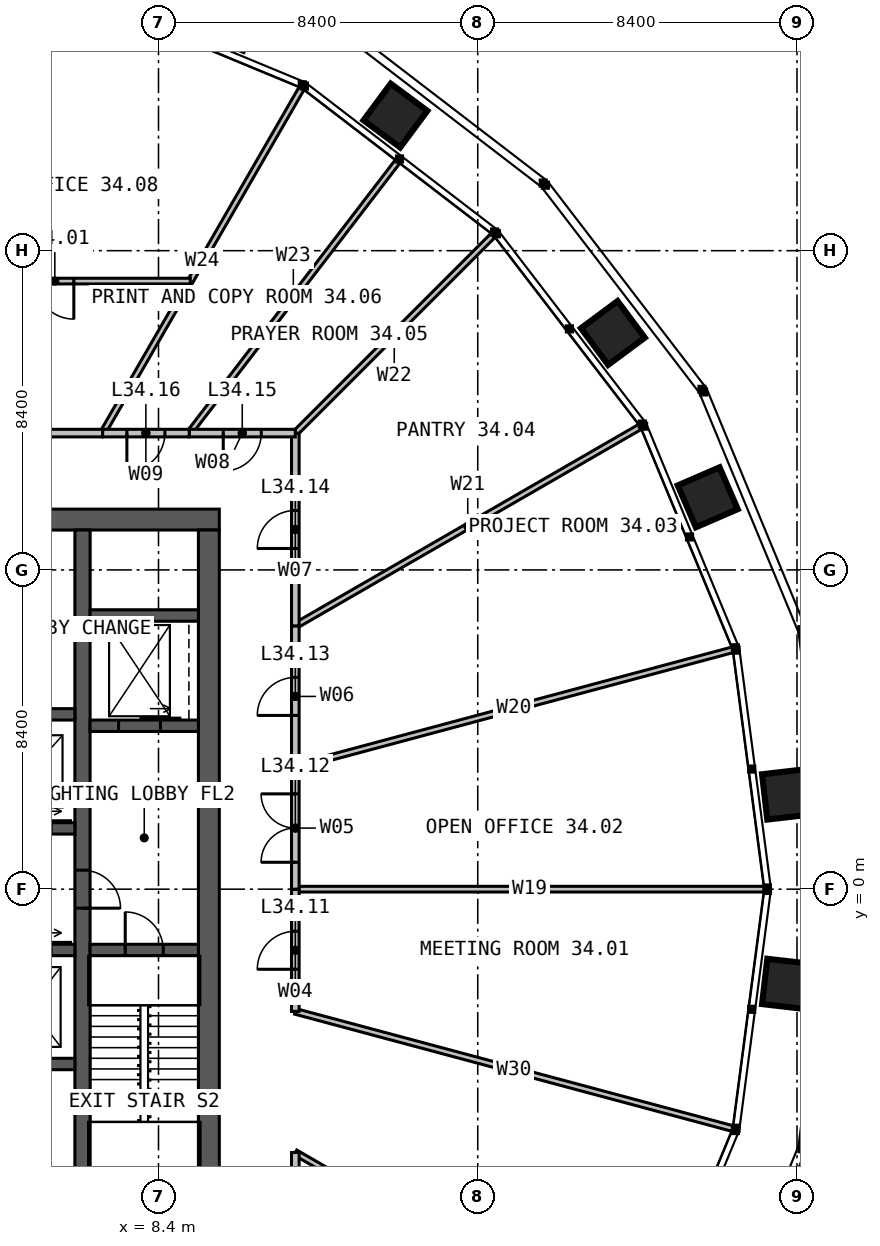
"""IFC4 building model, lengths in metres.
Left out: names, types, materials, properties, quantities, classifications, styles, units other than length and angle.
Written with IfcOpenShell. Run it as: python <this file> out.ifc"""

import sys

from ifc_helpers import new_model, si_unit, direction, frame, frame_2d, origin, place, context, subcontext, project, spatial, rectangle, extrude, element, fill, save


model = new_model("IFC4")
c1 = context("Model", 3, precision=1e-05, world=origin(), true_north=direction((0.0, 1.0)))
c2 = subcontext(c1, "Body", "Model", "MODEL_VIEW")
j1 = project(units=[si_unit("LENGTHUNIT", "METRE"), si_unit("PLANEANGLEUNIT", "RADIAN")], contexts=[c1])
p1 = place(None, origin())
s1 = spatial("IfcSite", under=j1, at=p1, CompositionType="ELEMENT")
p2 = place(p1, origin())
s2 = spatial("IfcBuilding", under=s1, at=p2, CompositionType="ELEMENT")
p3 = place(p2, frame((0.0, 0.0, 142.0)))
s3 = spatial("IfcBuildingStorey", under=s2, at=p3, CompositionType="ELEMENT", Elevation=142.0)
p4 = place(p3, frame((-10.0, 9.725, 0.0), z_axis=(0.0, 0.0, 1.0), x_axis=(1.0, 0.0, 0.0)))
e1 = element("IfcWall", 1, at=p4, inside=s3, PredefinedType="SOLIDWALL", context=c2, shape_type="SweptSolid", body=[
    extrude(rectangle(XDim=20.0, YDim=0.55, at=frame_2d((10.0, 0.0))), origin(), (0.0, 0.0, 1.0), 4.0),
])
p5 = place(p4, frame((9.4, 0.0, 0.0)))
e2 = element("IfcOpeningElement", 2, at=p5, cuts=e1, PredefinedType="OPENING", context=c2, shape_type="SweptSolid", body=[
    extrude(rectangle(XDim=1.2, YDim=2.2, at=frame_2d((0.6, 1.1))), frame((0.0, 0.285, 0.0), z_axis=(0.0, -1.0, 0.0), x_axis=(1.0, 0.0, 0.0)), (0.0, 0.0, 1.0), 0.57),
])
p6 = place(p3, frame((9.725, -9.45, 0.0), z_axis=(0.0, 0.0, 1.0), x_axis=(0.0, 1.0, 0.0)))
e3 = element("IfcWall", 3, at=p6, inside=s3, PredefinedType="SOLIDWALL", context=c2, shape_type="SweptSolid", body=[
    extrude(rectangle(XDim=18.9, YDim=0.55, at=frame_2d((9.45, 0.0))), origin(), (0.0, 0.0, 1.0), 4.0),
])
p7 = place(p3, frame((6.4, 9.45, 0.0), z_axis=(0.0, 0.0, 1.0), x_axis=(0.0, -1.0, 0.0)))
e4 = element("IfcWall", 4, at=p7, inside=s3, PredefinedType="SOLIDWALL", context=c2, shape_type="SweptSolid", body=[
    extrude(rectangle(XDim=18.9, YDim=0.4, at=frame_2d((9.45, 0.0))), origin(), (0.0, 0.0, 1.0), 4.0),
])
p8 = place(p7, frame((8.95, 0.0, 0.0)))
e5 = element("IfcOpeningElement", 5, at=p8, cuts=e4, PredefinedType="OPENING", context=c2, shape_type="SweptSolid", body=[
    extrude(rectangle(XDim=1.0, YDim=2.2, at=frame_2d((0.5, 1.1))), frame((0.0, 0.21, 0.0), z_axis=(0.0, -1.0, 0.0), x_axis=(1.0, 0.0, 0.0)), (0.0, 0.0, 1.0), 0.42),
])
p9 = place(p3, frame((1.35, 1.6, 0.0), z_axis=(0.0, 0.0, 1.0), x_axis=(1.0, 0.0, 0.0)))
e6 = element("IfcWall", 6, at=p9, inside=s3, PredefinedType="SOLIDWALL", context=c2, shape_type="SweptSolid", body=[
    extrude(rectangle(XDim=4.85, YDim=0.3, at=frame_2d((2.425, 0.0))), origin(), (0.0, 0.0, 1.0), 4.0),
])
p10 = place(p9, frame((0.6, 0.0, 0.0)))
e7 = element("IfcOpeningElement", 7, at=p10, cuts=e6, PredefinedType="OPENING", context=c2, shape_type="SweptSolid", body=[
    extrude(rectangle(XDim=1.1, YDim=2.2, at=frame_2d((0.55, 1.1))), frame((0.0, 0.16, 0.0), z_axis=(0.0, -1.0, 0.0), x_axis=(1.0, 0.0, 0.0)), (0.0, 0.0, 1.0), 0.32),
])
p11 = place(p9, frame((3.125, 0.0, 0.0)))
e8 = element("IfcOpeningElement", 8, at=p11, cuts=e6, PredefinedType="OPENING", context=c2, shape_type="SweptSolid", body=[
    extrude(rectangle(XDim=1.1, YDim=2.2, at=frame_2d((0.55, 1.1))), frame((0.0, 0.16, 0.0), z_axis=(0.0, -1.0, 0.0), x_axis=(1.0, 0.0, 0.0)), (0.0, 0.0, 1.0), 0.32),
])
p12 = place(p3, frame((1.35, 4.6, 0.0), z_axis=(0.0, 0.0, 1.0), x_axis=(1.0, 0.0, 0.0)))
e9 = element("IfcWall", 9, at=p12, inside=s3, PredefinedType="SOLIDWALL", context=c2, shape_type="SweptSolid", body=[
    extrude(rectangle(XDim=4.85, YDim=0.3, at=frame_2d((2.425, 0.0))), origin(), (0.0, 0.0, 1.0), 4.0),
])
p13 = place(p3, frame((3.85, -1.6, 0.0), z_axis=(0.0, 0.0, 1.0), x_axis=(1.0, 0.0, 0.0)))
e10 = element("IfcWall", 10, at=p13, inside=s3, PredefinedType="SOLIDWALL", context=c2, shape_type="SweptSolid", body=[
    extrude(rectangle(XDim=2.35, YDim=0.3, at=frame_2d((1.175, 0.0))), origin(), (0.0, 0.0, 1.0), 4.0),
])
p14 = place(p13, frame((0.625, 0.0, 0.0)))
e11 = element("IfcOpeningElement", 11, at=p14, cuts=e10, PredefinedType="OPENING", context=c2, shape_type="SweptSolid", body=[
    extrude(rectangle(XDim=1.1, YDim=2.2, at=frame_2d((0.55, 1.1))), frame((0.0, 0.16, 0.0), z_axis=(0.0, -1.0, 0.0), x_axis=(1.0, 0.0, 0.0)), (0.0, 0.0, 1.0), 0.32),
])
p15 = place(p3, frame((3.85, -4.6, 0.0), z_axis=(0.0, 0.0, 1.0), x_axis=(1.0, 0.0, 0.0)))
e12 = element("IfcWall", 12, at=p15, inside=s3, PredefinedType="SOLIDWALL", context=c2, shape_type="SweptSolid", body=[
    extrude(rectangle(XDim=2.35, YDim=0.3, at=frame_2d((1.175, 0.0))), origin(), (0.0, 0.0, 1.0), 4.0),
])
p16 = place(p3, frame((6.6, -1.6, 0.0), z_axis=(0.0, 0.0, 1.0), x_axis=(1.0, 0.0, 0.0)))
e13 = element("IfcWall", 13, at=p16, inside=s3, PredefinedType="SOLIDWALL", context=c2, shape_type="SweptSolid", body=[
    extrude(rectangle(XDim=2.85, YDim=0.3, at=frame_2d((1.425, 0.0))), origin(), (0.0, 0.0, 1.0), 4.0),
])
p17 = place(p16, frame((0.925, 0.0, 0.0)))
e14 = element("IfcOpeningElement", 14, at=p17, cuts=e13, PredefinedType="OPENING", context=c2, shape_type="SweptSolid", body=[
    extrude(rectangle(XDim=1.0, YDim=2.2, at=frame_2d((0.5, 1.1))), frame((0.0, 0.16, 0.0), z_axis=(0.0, -1.0, 0.0), x_axis=(1.0, 0.0, 0.0)), (0.0, 0.0, 1.0), 0.32),
])
p18 = place(p3, frame((6.6, 4.3, 0.0), z_axis=(0.0, 0.0, 1.0), x_axis=(1.0, 0.0, 0.0)))
e15 = element("IfcWall", 15, at=p18, inside=s3, PredefinedType="SOLIDWALL", context=c2, shape_type="SweptSolid", body=[
    extrude(rectangle(XDim=2.85, YDim=0.3, at=frame_2d((1.425, 0.0))), origin(), (0.0, 0.0, 1.0), 4.0),
])
p19 = place(p18, frame((0.75, 0.0, 0.0)))
e16 = element("IfcOpeningElement", 16, at=p19, cuts=e15, PredefinedType="OPENING", context=c2, shape_type="SweptSolid", body=[
    extrude(rectangle(XDim=1.1, YDim=2.2, at=frame_2d((0.55, 1.1))), frame((0.0, 0.16, 0.0), z_axis=(0.0, -1.0, 0.0), x_axis=(1.0, 0.0, 0.0)), (0.0, 0.0, 1.0), 0.32),
])
p20 = place(p3, frame((6.6, 7.2, 0.0), z_axis=(0.0, 0.0, 1.0), x_axis=(1.0, 0.0, 0.0)))
e17 = element("IfcWall", 17, at=p20, inside=s3, PredefinedType="SOLIDWALL", context=c2, shape_type="SweptSolid", body=[
    extrude(rectangle(XDim=2.85, YDim=0.3, at=frame_2d((1.425, 0.0))), origin(), (0.0, 0.0, 1.0), 4.0),
])
p21 = place(p3, frame((1.35, 6.8, 0.0), z_axis=(0.0, 0.0, 1.0), x_axis=(1.0, 0.0, 0.0)))
e18 = element("IfcWall", 18, at=p21, inside=s3, PredefinedType="PARTITIONING", context=c2, shape_type="SweptSolid", body=[
    extrude(rectangle(XDim=4.85, YDim=0.15, at=frame_2d((2.425, 0.0))), origin(), (0.0, 0.0, 1.0), 3.75),
])
p22 = place(p3, frame((12.0, -6.928, 0.0), z_axis=(0.0, 0.0, 1.0), x_axis=(0.866029212144, -0.49999340367, 0.0)))
e19 = element("IfcWall", 19, at=p22, inside=s3, PredefinedType="PARTITIONING", context=c2, shape_type="SweptSolid", body=[
    extrude(rectangle(XDim=10.478, YDim=0.15, at=frame_2d((5.239, 0.0))), origin(), (0.0, 0.0, 1.0), 2.79),
])
p23 = place(p3, frame((12.0, -3.215, 0.0), z_axis=(0.0, 0.0, 1.0), x_axis=(0.965926367889, -0.258817023816, 0.0)))
e20 = element("IfcWall", 20, at=p23, inside=s3, PredefinedType="PARTITIONING", context=c2, shape_type="SweptSolid", body=[
    extrude(rectangle(XDim=11.911, YDim=0.15, at=frame_2d((5.956, 0.0))), origin(), (0.0, 0.0, 1.0), 2.79),
])
p24 = place(p3, frame((12.0, 0.0, 0.0), z_axis=(0.0, 0.0, 1.0), x_axis=(1.0, 0.0, 0.0)))
e21 = element("IfcWall", 21, at=p24, inside=s3, PredefinedType="PARTITIONING", context=c2, shape_type="SweptSolid", body=[
    extrude(rectangle(XDim=12.334, YDim=0.15, at=frame_2d((6.167, 0.0))), origin(), (0.0, 0.0, 1.0), 2.79),
])
p25 = place(p3, frame((12.0, 3.215, 0.0), z_axis=(0.0, 0.0, 1.0), x_axis=(0.965926367889, 0.258817023816, 0.0)))
e22 = element("IfcWall", 22, at=p25, inside=s3, PredefinedType="PARTITIONING", context=c2, shape_type="SweptSolid", body=[
    extrude(rectangle(XDim=11.911, YDim=0.15, at=frame_2d((5.956, 0.0))), origin(), (0.0, 0.0, 1.0), 2.79),
])
p26 = place(p3, frame((12.0, 6.928, 0.0), z_axis=(0.0, 0.0, 1.0), x_axis=(0.866029212144, 0.49999340367, 0.0)))
e23 = element("IfcWall", 23, at=p26, inside=s3, PredefinedType="PARTITIONING", context=c2, shape_type="SweptSolid", body=[
    extrude(rectangle(XDim=10.478, YDim=0.15, at=frame_2d((5.239, 0.0))), origin(), (0.0, 0.0, 1.0), 2.79),
])
p27 = place(p3, frame((12.0, 12.0, 0.0), z_axis=(0.0, 0.0, 1.0), x_axis=(0.707106781187, 0.707106781187, 0.0)))
e24 = element("IfcWall", 24, at=p27, inside=s3, PredefinedType="PARTITIONING", context=c2, shape_type="SweptSolid", body=[
    extrude(rectangle(XDim=7.364, YDim=0.15, at=frame_2d((3.682, 0.0))), origin(), (0.0, 0.0, 1.0), 2.79),
])
p28 = place(p3, frame((9.208, 12.0, 0.0), z_axis=(0.0, 0.0, 1.0), x_axis=(0.608761217002, 0.79335350297, 0.0)))
e25 = element("IfcWall", 25, at=p28, inside=s3, PredefinedType="PARTITIONING", context=c2, shape_type="SweptSolid", body=[
    extrude(rectangle(XDim=9.0, YDim=0.15, at=frame_2d((4.5, 0.0))), origin(), (0.0, 0.0, 1.0), 2.79),
])
p29 = place(p3, frame((6.928, 12.0, 0.0), z_axis=(0.0, 0.0, 1.0), x_axis=(0.49999340367, 0.866029212144, 0.0)))
e26 = element("IfcWall", 26, at=p29, inside=s3, PredefinedType="PARTITIONING", context=c2, shape_type="SweptSolid", body=[
    extrude(rectangle(XDim=10.478, YDim=0.15, at=frame_2d((5.239, 0.0))), origin(), (0.0, 0.0, 1.0), 2.79),
])
p30 = place(p3, frame((12.0, -3.215, 0.0), z_axis=(0.0, 0.0, 1.0), x_axis=(0.0, 1.0, 0.0)))
e27 = element("IfcWall", 27, at=p30, inside=s3, PredefinedType="PARTITIONING", context=c2, shape_type="SweptSolid", body=[
    extrude(rectangle(XDim=3.215, YDim=0.2, at=frame_2d((1.608, 0.0))), origin(), (0.0, 0.0, 1.0), 3.8),
])
p31 = place(p30, frame((1.108, 0.0, 0.0)))
e28 = element("IfcOpeningElement", 28, at=p31, cuts=e27, PredefinedType="OPENING", context=c2, shape_type="SweptSolid", body=[
    extrude(rectangle(XDim=1.0, YDim=2.2, at=frame_2d((0.5, 1.1))), frame((0.0, 0.11, 0.0), z_axis=(0.0, -1.0, 0.0), x_axis=(1.0, 0.0, 0.0)), (0.0, 0.0, 1.0), 0.22),
])
p32 = place(p3, frame((12.0, 0.0, 0.0), z_axis=(0.0, 0.0, 1.0), x_axis=(0.0, 1.0, 0.0)))
e29 = element("IfcWall", 29, at=p32, inside=s3, PredefinedType="PARTITIONING", context=c2, shape_type="SweptSolid", body=[
    extrude(rectangle(XDim=3.215, YDim=0.2, at=frame_2d((1.608, 0.0))), origin(), (0.0, 0.0, 1.0), 3.8),
])
p33 = place(p32, frame((0.708, 0.0, 0.0)))
e30 = element("IfcOpeningElement", 30, at=p33, cuts=e29, PredefinedType="OPENING", context=c2, shape_type="SweptSolid", body=[
    extrude(rectangle(XDim=1.8, YDim=2.2, at=frame_2d((0.9, 1.1))), frame((0.0, 0.11, 0.0), z_axis=(0.0, -1.0, 0.0), x_axis=(1.0, 0.0, 0.0)), (0.0, 0.0, 1.0), 0.22),
])
p34 = place(p3, frame((12.0, 3.215, 0.0), z_axis=(0.0, 0.0, 1.0), x_axis=(0.0, 1.0, 0.0)))
e31 = element("IfcWall", 31, at=p34, inside=s3, PredefinedType="PARTITIONING", context=c2, shape_type="SweptSolid", body=[
    extrude(rectangle(XDim=3.713, YDim=0.2, at=frame_2d((1.856, 0.0))), origin(), (0.0, 0.0, 1.0), 3.8),
])
p35 = place(p34, frame((1.356, 0.0, 0.0)))
e32 = element("IfcOpeningElement", 32, at=p35, cuts=e31, PredefinedType="OPENING", context=c2, shape_type="SweptSolid", body=[
    extrude(rectangle(XDim=1.0, YDim=2.2, at=frame_2d((0.5, 1.1))), frame((0.0, 0.11, 0.0), z_axis=(0.0, -1.0, 0.0), x_axis=(1.0, 0.0, 0.0)), (0.0, 0.0, 1.0), 0.22),
])
p36 = place(p3, frame((12.0, 6.928, 0.0), z_axis=(0.0, 0.0, 1.0), x_axis=(0.0, 1.0, 0.0)))
e33 = element("IfcWall", 33, at=p36, inside=s3, PredefinedType="PARTITIONING", context=c2, shape_type="SweptSolid", body=[
    extrude(rectangle(XDim=5.072, YDim=0.2, at=frame_2d((2.536, 0.0))), origin(), (0.0, 0.0, 1.0), 3.8),
])
p37 = place(p36, frame((2.036, 0.0, 0.0)))
e34 = element("IfcOpeningElement", 34, at=p37, cuts=e33, PredefinedType="OPENING", context=c2, shape_type="SweptSolid", body=[
    extrude(rectangle(XDim=1.0, YDim=2.2, at=frame_2d((0.5, 1.1))), frame((0.0, 0.11, 0.0), z_axis=(0.0, -1.0, 0.0), x_axis=(1.0, 0.0, 0.0)), (0.0, 0.0, 1.0), 0.22),
])
p38 = place(p3, frame((12.0, 12.0, 0.0), z_axis=(0.0, 0.0, 1.0), x_axis=(-1.0, 0.0, 0.0)))
e35 = element("IfcWall", 35, at=p38, inside=s3, PredefinedType="PARTITIONING", context=c2, shape_type="SweptSolid", body=[
    extrude(rectangle(XDim=2.792, YDim=0.2, at=frame_2d((1.396, 0.0))), origin(), (0.0, 0.0, 1.0), 3.8),
])
p39 = place(p38, frame((0.896, 0.0, 0.0)))
e36 = element("IfcOpeningElement", 36, at=p39, cuts=e35, PredefinedType="OPENING", context=c2, shape_type="SweptSolid", body=[
    extrude(rectangle(XDim=1.0, YDim=2.2, at=frame_2d((0.5, 1.1))), frame((0.0, 0.11, 0.0), z_axis=(0.0, -1.0, 0.0), x_axis=(1.0, 0.0, 0.0)), (0.0, 0.0, 1.0), 0.22),
])
p40 = place(p3, frame((9.208, 12.0, 0.0), z_axis=(0.0, 0.0, 1.0), x_axis=(-1.0, 0.0, 0.0)))
e37 = element("IfcWall", 37, at=p40, inside=s3, PredefinedType="PARTITIONING", context=c2, shape_type="SweptSolid", body=[
    extrude(rectangle(XDim=2.28, YDim=0.2, at=frame_2d((1.14, 0.0))), origin(), (0.0, 0.0, 1.0), 3.8),
])
p41 = place(p40, frame((0.64, 0.0, 0.0)))
e38 = element("IfcOpeningElement", 38, at=p41, cuts=e37, PredefinedType="OPENING", context=c2, shape_type="SweptSolid", body=[
    extrude(rectangle(XDim=1.0, YDim=2.2, at=frame_2d((0.5, 1.1))), frame((0.0, 0.11, 0.0), z_axis=(0.0, -1.0, 0.0), x_axis=(1.0, 0.0, 0.0)), (0.0, 0.0, 1.0), 0.22),
])
p42 = place(p3, frame((9.238, 16.0, 0.0), z_axis=(0.0, 0.0, 1.0), x_axis=(-1.0, 0.0, 0.0)))
e39 = element("IfcWall", 39, at=p42, inside=s3, PredefinedType="PARTITIONING", context=c2, shape_type="SweptSolid", body=[
    extrude(rectangle(XDim=18.475, YDim=0.15, at=frame_2d((9.238, 0.0))), origin(), (0.0, 0.0, 1.0), 2.79),
])
p43 = place(p42, frame((3.066, 0.0, 0.0)))
e40 = element("IfcOpeningElement", 40, at=p43, cuts=e39, PredefinedType="OPENING", context=c2, shape_type="SweptSolid", body=[
    extrude(rectangle(XDim=1.0, YDim=2.2, at=frame_2d((0.5, 1.1))), frame((0.0, 0.085, 0.0), z_axis=(0.0, -1.0, 0.0), x_axis=(1.0, 0.0, 0.0)), (0.0, 0.0, 1.0), 0.17),
])
p44 = place(p42, frame((8.738, 0.0, 0.0)))
e41 = element("IfcOpeningElement", 41, at=p44, cuts=e39, PredefinedType="OPENING", context=c2, shape_type="SweptSolid", body=[
    extrude(rectangle(XDim=1.0, YDim=2.2, at=frame_2d((0.5, 1.1))), frame((0.0, 0.085, 0.0), z_axis=(0.0, -1.0, 0.0), x_axis=(1.0, 0.0, 0.0)), (0.0, 0.0, 1.0), 0.17),
])
p45 = place(p42, frame((13.104, 0.0, 0.0)))
e42 = element("IfcOpeningElement", 42, at=p45, cuts=e39, PredefinedType="OPENING", context=c2, shape_type="SweptSolid", body=[
    extrude(rectangle(XDim=1.0, YDim=2.2, at=frame_2d((0.5, 1.1))), frame((0.0, 0.085, 0.0), z_axis=(0.0, -1.0, 0.0), x_axis=(1.0, 0.0, 0.0)), (0.0, 0.0, 1.0), 0.17),
])
p46 = place(p42, frame((16.67, 0.0, 0.0)))
e43 = element("IfcOpeningElement", 43, at=p46, cuts=e39, PredefinedType="OPENING", context=c2, shape_type="SweptSolid", body=[
    extrude(rectangle(XDim=1.0, YDim=2.2, at=frame_2d((0.5, 1.1))), frame((0.0, 0.085, 0.0), z_axis=(0.0, -1.0, 0.0), x_axis=(1.0, 0.0, 0.0)), (0.0, 0.0, 1.0), 0.17),
])
p47 = place(p3, frame((6.928, 12.0, 0.0), z_axis=(0.0, 0.0, 1.0), x_axis=(-1.0, 0.0, 0.0)))
e44 = element("IfcWall", 44, at=p47, inside=s3, PredefinedType="PARTITIONING", context=c2, shape_type="SweptSolid", body=[
    extrude(rectangle(XDim=13.856, YDim=0.2, at=frame_2d((6.928, 0.0))), origin(), (0.0, 0.0, 1.0), 3.8),
])
p48 = place(p47, frame((6.028, 0.0, 0.0)))
e45 = element("IfcOpeningElement", 45, at=p48, cuts=e44, PredefinedType="OPENING", context=c2, shape_type="SweptSolid", body=[
    extrude(rectangle(XDim=1.8, YDim=2.2, at=frame_2d((0.9, 1.1))), frame((0.0, 0.11, 0.0), z_axis=(0.0, -1.0, 0.0), x_axis=(1.0, 0.0, 0.0)), (0.0, 0.0, 1.0), 0.22),
])
p49 = place(p3, frame((12.0, -10.0, 0.0), z_axis=(0.0, 0.0, 1.0), x_axis=(0.0, 1.0, 0.0)))
e46 = element("IfcWall", 46, at=p49, inside=s3, PredefinedType="PARTITIONING", context=c2, shape_type="SweptSolid", body=[
    extrude(rectangle(XDim=3.072, YDim=0.2, at=frame_2d((1.536, 0.0))), origin(), (0.0, 0.0, 1.0), 3.8),
])
p50 = place(p8, origin())
e47 = element("IfcDoor", 47, at=p50, inside=s3, OperationType="SINGLE_SWING_RIGHT", PredefinedType="DOOR", context=c2, shape_type="SweptSolid", body=[
    extrude(rectangle(XDim=1.0, YDim=2.2, at=frame_2d((0.5, 1.1))), frame((0.0, 0.025, 0.0), z_axis=(0.0, -1.0, 0.0), x_axis=(1.0, 0.0, 0.0)), (0.0, 0.0, 1.0), 0.05),
])
fill(e5, e47)
p51 = place(p17, origin())
e48 = element("IfcDoor", 48, at=p51, inside=s3, OperationType="SINGLE_SWING_LEFT", PredefinedType="DOOR", context=c2, shape_type="SweptSolid", body=[
    extrude(rectangle(XDim=1.0, YDim=2.2, at=frame_2d((0.5, 1.1))), frame((0.0, 0.025, 0.0), z_axis=(0.0, -1.0, 0.0), x_axis=(1.0, 0.0, 0.0)), (0.0, 0.0, 1.0), 0.05),
])
fill(e14, e48)
p52 = place(p19, origin())
e49 = element("IfcDoor", 49, at=p52, inside=s3, OperationType="SLIDING_TO_LEFT", PredefinedType="DOOR", context=c2, shape_type="SweptSolid", body=[
    extrude(rectangle(XDim=1.1, YDim=2.2, at=frame_2d((0.55, 1.1))), frame((0.0, 0.025, 0.0), z_axis=(0.0, -1.0, 0.0), x_axis=(1.0, 0.0, 0.0)), (0.0, 0.0, 1.0), 0.05),
])
fill(e16, e49)
p53 = place(p31, origin())
e50 = element("IfcDoor", 50, at=p53, inside=s3, OperationType="SINGLE_SWING_LEFT", PredefinedType="DOOR", context=c2, shape_type="SweptSolid", body=[
    extrude(rectangle(XDim=1.0, YDim=2.2, at=frame_2d((0.5, 1.1))), frame((0.0, 0.025, 0.0), z_axis=(0.0, -1.0, 0.0), x_axis=(1.0, 0.0, 0.0)), (0.0, 0.0, 1.0), 0.05),
])
fill(e28, e50)
p54 = place(p33, origin())
e51 = element("IfcDoor", 51, at=p54, inside=s3, OperationType="DOUBLE_DOOR_SINGLE_SWING", PredefinedType="DOOR", context=c2, shape_type="SweptSolid", body=[
    extrude(rectangle(XDim=1.8, YDim=2.2, at=frame_2d((0.9, 1.1))), frame((0.0, 0.025, 0.0), z_axis=(0.0, -1.0, 0.0), x_axis=(1.0, 0.0, 0.0)), (0.0, 0.0, 1.0), 0.05),
])
fill(e30, e51)
p55 = place(p35, origin())
e52 = element("IfcDoor", 52, at=p55, inside=s3, OperationType="SINGLE_SWING_LEFT", PredefinedType="DOOR", context=c2, shape_type="SweptSolid", body=[
    extrude(rectangle(XDim=1.0, YDim=2.2, at=frame_2d((0.5, 1.1))), frame((0.0, 0.025, 0.0), z_axis=(0.0, -1.0, 0.0), x_axis=(1.0, 0.0, 0.0)), (0.0, 0.0, 1.0), 0.05),
])
fill(e32, e52)
p56 = place(p37, origin())
e53 = element("IfcDoor", 53, at=p56, inside=s3, OperationType="SINGLE_SWING_LEFT", PredefinedType="DOOR", context=c2, shape_type="SweptSolid", body=[
    extrude(rectangle(XDim=1.0, YDim=2.2, at=frame_2d((0.5, 1.1))), frame((0.0, 0.025, 0.0), z_axis=(0.0, -1.0, 0.0), x_axis=(1.0, 0.0, 0.0)), (0.0, 0.0, 1.0), 0.05),
])
fill(e34, e53)
p57 = place(p39, origin())
e54 = element("IfcDoor", 54, at=p57, inside=s3, OperationType="SINGLE_SWING_RIGHT", PredefinedType="DOOR", context=c2, shape_type="SweptSolid", body=[
    extrude(rectangle(XDim=1.0, YDim=2.2, at=frame_2d((0.5, 1.1))), frame((0.0, 0.025, 0.0), z_axis=(0.0, -1.0, 0.0), x_axis=(1.0, 0.0, 0.0)), (0.0, 0.0, 1.0), 0.05),
])
fill(e36, e54)
p58 = place(p41, origin())
e55 = element("IfcDoor", 55, at=p58, inside=s3, OperationType="SINGLE_SWING_RIGHT", PredefinedType="DOOR", context=c2, shape_type="SweptSolid", body=[
    extrude(rectangle(XDim=1.0, YDim=2.2, at=frame_2d((0.5, 1.1))), frame((0.0, 0.025, 0.0), z_axis=(0.0, -1.0, 0.0), x_axis=(1.0, 0.0, 0.0)), (0.0, 0.0, 1.0), 0.05),
])
fill(e38, e55)
p59 = place(p43, origin())
e56 = element("IfcDoor", 56, at=p59, inside=s3, OperationType="SINGLE_SWING_LEFT", PredefinedType="DOOR", context=c2, shape_type="SweptSolid", body=[
    extrude(rectangle(XDim=1.0, YDim=2.2, at=frame_2d((0.5, 1.1))), frame((0.0, 0.025, 0.0), z_axis=(0.0, -1.0, 0.0), x_axis=(1.0, 0.0, 0.0)), (0.0, 0.0, 1.0), 0.05),
])
fill(e40, e56)
save(model, sys.argv[1])
